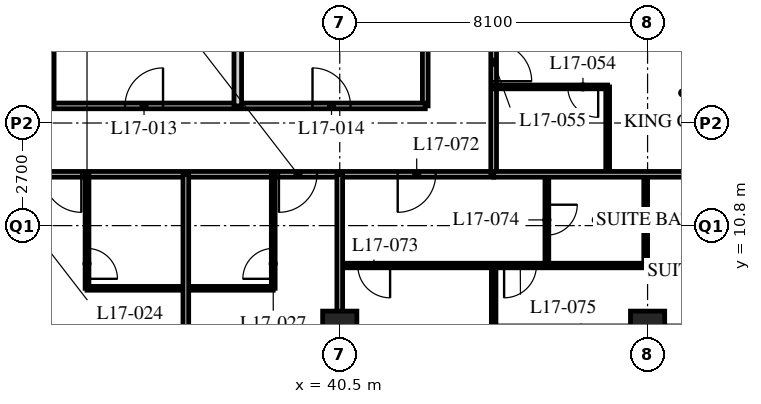
"""IFC4 building model, lengths in metres.
Left out: names, types, materials, properties, quantities, classifications, styles, units other than length and angle.
Written with IfcOpenShell. Run it as: python <this file> out.ifc"""

import sys

from ifc_helpers import new_model, si_unit, direction, frame, frame_2d, origin, origin_2d, place, context, subcontext, project, spatial, rectangle, hollow_rectangle, extrude, element, fill, save


model = new_model("IFC4")
c1 = context("Model", 3, precision=1e-05, world=origin(), true_north=direction((0.0, 1.0)))
c2 = subcontext(c1, "Body", "Model", "MODEL_VIEW")
j1 = project(units=[si_unit("LENGTHUNIT", "METRE"), si_unit("PLANEANGLEUNIT", "RADIAN")], contexts=[c1])
p1 = place(None, origin())
s1 = spatial("IfcSite", under=j1, at=p1, CompositionType="ELEMENT")
p2 = place(p1, origin())
s2 = spatial("IfcBuilding", under=s1, at=p2, CompositionType="ELEMENT")
p3 = place(p2, frame((0.0, 0.0, 70.4)))
s3 = spatial("IfcBuildingStorey", under=s2, at=p3, CompositionType="ELEMENT", Elevation=70.4)
for number, where, z_axis, x_axis in (
    (1, (40.5, 8.1, 0.0), (0.0, 0.0, 1.0), (1.0, 0.0, 0.0)),
    (2, (48.6, 8.1, 0.0), (0.0, 0.0, 1.0), (1.0, 0.0, 0.0)),
):
    element("IfcColumn", number, at=place(p3, frame(where, z_axis=z_axis, x_axis=x_axis)), inside=s3, PredefinedType="COLUMN", context=c2, shape_type="SweptSolid", body=[
        extrude(hollow_rectangle(XDim=0.9, YDim=0.9, WallThickness=0.09, at=origin_2d()), origin(), (0.0, 0.0, 1.0), 3.4),
    ])
p4 = place(p3, frame((8.1, 12.15, 0.0), z_axis=(0.0, 0.0, 1.0), x_axis=(1.0, 0.0, 0.0)))
e3 = element("IfcWall", 3, at=p4, inside=s3, PredefinedType="PARTITIONING", context=c2, shape_type="SweptSolid", body=[
    extrude(rectangle(XDim=36.45, YDim=0.15, at=frame_2d((18.225, 0.0))), origin(), (0.0, 0.0, 1.0), 3.19),
])
p5 = place(p4, frame((4.35, 0.0, 0.0)))
e4 = element("IfcOpeningElement", 4, at=p5, cuts=e3, PredefinedType="OPENING", context=c2, shape_type="SweptSolid", body=[
    extrude(rectangle(XDim=1.0, YDim=2.1, at=frame_2d((0.5, 1.05))), frame((0.0, 0.085, 0.0), z_axis=(0.0, -1.0, 0.0), x_axis=(1.0, 0.0, 0.0)), (0.0, 0.0, 1.0), 0.17),
])
p6 = place(p4, frame((10.55, 0.0, 0.0)))
e5 = element("IfcOpeningElement", 5, at=p6, cuts=e3, PredefinedType="OPENING", context=c2, shape_type="SweptSolid", body=[
    extrude(rectangle(XDim=1.0, YDim=2.1, at=frame_2d((0.5, 1.05))), frame((0.0, 0.085, 0.0), z_axis=(0.0, -1.0, 0.0), x_axis=(1.0, 0.0, 0.0)), (0.0, 0.0, 1.0), 0.17),
])
p7 = place(p4, frame((14.6, 0.0, 0.0)))
e6 = element("IfcOpeningElement", 6, at=p7, cuts=e3, PredefinedType="OPENING", context=c2, shape_type="SweptSolid", body=[
    extrude(rectangle(XDim=1.0, YDim=2.1, at=frame_2d((0.5, 1.05))), frame((0.0, 0.085, 0.0), z_axis=(0.0, -1.0, 0.0), x_axis=(1.0, 0.0, 0.0)), (0.0, 0.0, 1.0), 0.17),
])
p8 = place(p4, frame((18.65, 0.0, 0.0)))
e7 = element("IfcOpeningElement", 7, at=p8, cuts=e3, PredefinedType="OPENING", context=c2, shape_type="SweptSolid", body=[
    extrude(rectangle(XDim=1.0, YDim=2.1, at=frame_2d((0.5, 1.05))), frame((0.0, 0.085, 0.0), z_axis=(0.0, -1.0, 0.0), x_axis=(1.0, 0.0, 0.0)), (0.0, 0.0, 1.0), 0.17),
])
p9 = place(p4, frame((22.7, 0.0, 0.0)))
e8 = element("IfcOpeningElement", 8, at=p9, cuts=e3, PredefinedType="OPENING", context=c2, shape_type="SweptSolid", body=[
    extrude(rectangle(XDim=1.0, YDim=2.1, at=frame_2d((0.5, 1.05))), frame((0.0, 0.085, 0.0), z_axis=(0.0, -1.0, 0.0), x_axis=(1.0, 0.0, 0.0)), (0.0, 0.0, 1.0), 0.17),
])
p10 = place(p4, frame((24.6, 0.0, 0.0)))
e9 = element("IfcOpeningElement", 9, at=p10, cuts=e3, PredefinedType="OPENING", context=c2, shape_type="SweptSolid", body=[
    extrude(rectangle(XDim=1.0, YDim=2.1, at=frame_2d((0.5, 1.05))), frame((0.0, 0.085, 0.0), z_axis=(0.0, -1.0, 0.0), x_axis=(1.0, 0.0, 0.0)), (0.0, 0.0, 1.0), 0.17),
])
p11 = place(p4, frame((30.8, 0.0, 0.0)))
e10 = element("IfcOpeningElement", 10, at=p11, cuts=e3, PredefinedType="OPENING", context=c2, shape_type="SweptSolid", body=[
    extrude(rectangle(XDim=1.0, YDim=2.1, at=frame_2d((0.5, 1.05))), frame((0.0, 0.085, 0.0), z_axis=(0.0, -1.0, 0.0), x_axis=(1.0, 0.0, 0.0)), (0.0, 0.0, 1.0), 0.17),
])
p12 = place(p4, frame((1.525, 0.0, 0.0)))
e11 = element("IfcOpeningElement", 11, at=p12, cuts=e3, PredefinedType="OPENING", context=c2, shape_type="SweptSolid", body=[
    extrude(rectangle(XDim=1.0, YDim=2.1, at=frame_2d((0.5, 1.05))), frame((0.0, 0.085, 0.0), z_axis=(0.0, -1.0, 0.0), x_axis=(1.0, 0.0, 0.0)), (0.0, 0.0, 1.0), 0.17),
])
p13 = place(p4, frame((33.925, 0.0, 0.0)))
e12 = element("IfcOpeningElement", 12, at=p13, cuts=e3, PredefinedType="OPENING", context=c2, shape_type="SweptSolid", body=[
    extrude(rectangle(XDim=1.0, YDim=2.1, at=frame_2d((0.5, 1.05))), frame((0.0, 0.085, 0.0), z_axis=(0.0, -1.0, 0.0), x_axis=(1.0, 0.0, 0.0)), (0.0, 0.0, 1.0), 0.17),
])
p14 = place(p3, frame((44.55, 12.15, 0.0), z_axis=(0.0, 0.0, 1.0), x_axis=(0.0, 1.0, 0.0)))
e13 = element("IfcWall", 13, at=p14, inside=s3, PredefinedType="PARTITIONING", context=c2, shape_type="SweptSolid", body=[
    extrude(rectangle(XDim=30.15, YDim=0.15, at=frame_2d((15.075, 0.0))), origin(), (0.0, 0.0, 1.0), 3.19),
])
p15 = place(p14, frame((2.45, 0.0, 0.0)))
e14 = element("IfcOpeningElement", 14, at=p15, cuts=e13, PredefinedType="OPENING", context=c2, shape_type="SweptSolid", body=[
    extrude(rectangle(XDim=1.0, YDim=2.1, at=frame_2d((0.5, 1.05))), frame((0.0, 0.085, 0.0), z_axis=(0.0, -1.0, 0.0), x_axis=(1.0, 0.0, 0.0)), (0.0, 0.0, 1.0), 0.17),
])
p16 = place(p14, frame((4.35, 0.0, 0.0)))
e15 = element("IfcOpeningElement", 15, at=p16, cuts=e13, PredefinedType="OPENING", context=c2, shape_type="SweptSolid", body=[
    extrude(rectangle(XDim=1.0, YDim=2.1, at=frame_2d((0.5, 1.05))), frame((0.0, 0.085, 0.0), z_axis=(0.0, -1.0, 0.0), x_axis=(1.0, 0.0, 0.0)), (0.0, 0.0, 1.0), 0.17),
])
p17 = place(p14, frame((8.4, 0.0, 0.0)))
e16 = element("IfcOpeningElement", 16, at=p17, cuts=e13, PredefinedType="OPENING", context=c2, shape_type="SweptSolid", body=[
    extrude(rectangle(XDim=1.0, YDim=2.1, at=frame_2d((0.5, 1.05))), frame((0.0, 0.085, 0.0), z_axis=(0.0, -1.0, 0.0), x_axis=(1.0, 0.0, 0.0)), (0.0, 0.0, 1.0), 0.17),
])
p18 = place(p14, frame((14.6, 0.0, 0.0)))
e17 = element("IfcOpeningElement", 17, at=p18, cuts=e13, PredefinedType="OPENING", context=c2, shape_type="SweptSolid", body=[
    extrude(rectangle(XDim=1.0, YDim=2.1, at=frame_2d((0.5, 1.05))), frame((0.0, 0.085, 0.0), z_axis=(0.0, -1.0, 0.0), x_axis=(1.0, 0.0, 0.0)), (0.0, 0.0, 1.0), 0.17),
])
p19 = place(p14, frame((21.65, 0.0, 0.0)))
e18 = element("IfcOpeningElement", 18, at=p19, cuts=e13, PredefinedType="OPENING", context=c2, shape_type="SweptSolid", body=[
    extrude(rectangle(XDim=1.0, YDim=2.1, at=frame_2d((0.5, 1.05))), frame((0.0, 0.085, 0.0), z_axis=(0.0, -1.0, 0.0), x_axis=(1.0, 0.0, 0.0)), (0.0, 0.0, 1.0), 0.17),
])
p20 = place(p14, frame((26.7, 0.0, 0.0)))
e19 = element("IfcOpeningElement", 19, at=p20, cuts=e13, PredefinedType="OPENING", context=c2, shape_type="SweptSolid", body=[
    extrude(rectangle(XDim=1.0, YDim=2.1, at=frame_2d((0.5, 1.05))), frame((0.0, 0.085, 0.0), z_axis=(0.0, -1.0, 0.0), x_axis=(1.0, 0.0, 0.0)), (0.0, 0.0, 1.0), 0.17),
])
p21 = place(p3, frame((42.75, 13.95, 0.0), z_axis=(0.0, 0.0, 1.0), x_axis=(0.0, 1.0, 0.0)))
e20 = element("IfcWall", 20, at=p21, inside=s3, PredefinedType="PARTITIONING", context=c2, shape_type="SweptSolid", body=[
    extrude(rectangle(XDim=26.55, YDim=0.15, at=frame_2d((13.275, 0.0))), origin(), (0.0, 0.0, 1.0), 3.19),
])
p22 = place(p21, frame((13.9, 0.0, 0.0)))
e21 = element("IfcOpeningElement", 21, at=p22, cuts=e20, PredefinedType="OPENING", context=c2, shape_type="SweptSolid", body=[
    extrude(rectangle(XDim=1.0, YDim=2.1, at=frame_2d((0.5, 1.05))), frame((0.0, 0.085, 0.0), z_axis=(0.0, -1.0, 0.0), x_axis=(1.0, 0.0, 0.0)), (0.0, 0.0, 1.0), 0.17),
])
p23 = place(p21, frame((22.0, 0.0, 0.0)))
e22 = element("IfcOpeningElement", 22, at=p23, cuts=e20, PredefinedType="OPENING", context=c2, shape_type="SweptSolid", body=[
    extrude(rectangle(XDim=1.0, YDim=2.1, at=frame_2d((0.5, 1.05))), frame((0.0, 0.085, 0.0), z_axis=(0.0, -1.0, 0.0), x_axis=(1.0, 0.0, 0.0)), (0.0, 0.0, 1.0), 0.17),
])
p24 = place(p3, frame((29.56, 13.95, 0.0), z_axis=(0.0, 0.0, 1.0), x_axis=(1.0, 0.0, 0.0)))
e23 = element("IfcWall", 23, at=p24, inside=s3, PredefinedType="PARTITIONING", context=c2, shape_type="SweptSolid", body=[
    extrude(rectangle(XDim=13.19, YDim=0.15, at=frame_2d((6.595, 0.0))), origin(), (0.0, 0.0, 1.0), 3.19),
])
p25 = place(p24, frame((1.157, 0.0, 0.0)))
e24 = element("IfcOpeningElement", 24, at=p25, cuts=e23, PredefinedType="OPENING", context=c2, shape_type="SweptSolid", body=[
    extrude(rectangle(XDim=1.0, YDim=2.1, at=frame_2d((0.5, 1.05))), frame((0.0, 0.085, 0.0), z_axis=(0.0, -1.0, 0.0), x_axis=(1.0, 0.0, 0.0)), (0.0, 0.0, 1.0), 0.17),
])
p26 = place(p24, frame((5.29, 0.0, 0.0)))
e25 = element("IfcOpeningElement", 25, at=p26, cuts=e23, PredefinedType="OPENING", context=c2, shape_type="SweptSolid", body=[
    extrude(rectangle(XDim=1.0, YDim=2.1, at=frame_2d((0.5, 1.05))), frame((0.0, 0.085, 0.0), z_axis=(0.0, -1.0, 0.0), x_axis=(1.0, 0.0, 0.0)), (0.0, 0.0, 1.0), 0.17),
])
p27 = place(p24, frame((10.223, 0.0, 0.0)))
e26 = element("IfcOpeningElement", 26, at=p27, cuts=e23, PredefinedType="OPENING", context=c2, shape_type="SweptSolid", body=[
    extrude(rectangle(XDim=1.0, YDim=2.1, at=frame_2d((0.5, 1.05))), frame((0.0, 0.085, 0.0), z_axis=(0.0, -1.0, 0.0), x_axis=(1.0, 0.0, 0.0)), (0.0, 0.0, 1.0), 0.17),
])
p28 = place(p3, frame((32.883, 13.95, 0.0), z_axis=(0.0, 0.0, 1.0), x_axis=(0.0, 1.0, 0.0)))
e27 = element("IfcWall", 27, at=p28, inside=s3, PredefinedType="SOLIDWALL", context=c2, shape_type="SweptSolid", body=[
    extrude(rectangle(XDim=3.0, YDim=0.2, at=frame_2d((1.5, 0.0))), origin(), (0.0, 0.0, 1.0), 3.19),
])
p29 = place(p3, frame((37.817, 13.95, 0.0), z_axis=(0.0, 0.0, 1.0), x_axis=(0.0, 1.0, 0.0)))
e28 = element("IfcWall", 28, at=p29, inside=s3, PredefinedType="SOLIDWALL", context=c2, shape_type="SweptSolid", body=[
    extrude(rectangle(XDim=10.35, YDim=0.2, at=frame_2d((5.175, 0.0))), origin(), (0.0, 0.0, 1.0), 3.19),
])
p30 = place(p3, frame((33.85, 9.15, 0.0), z_axis=(0.0, 0.0, 1.0), x_axis=(1.0, 0.0, 0.0)))
e29 = element("IfcWall", 29, at=p30, inside=s3, PredefinedType="PARTITIONING", context=c2, shape_type="SweptSolid", body=[
    extrude(rectangle(XDim=4.9, YDim=0.1, at=frame_2d((2.45, 0.0))), origin(), (0.0, 0.0, 1.0), 3.19),
])
p31 = place(p3, frame((33.85, 12.15, 0.0), z_axis=(0.0, 0.0, 1.0), x_axis=(0.0, -1.0, 0.0)))
e30 = element("IfcWall", 30, at=p31, inside=s3, PredefinedType="PARTITIONING", context=c2, shape_type="SweptSolid", body=[
    extrude(rectangle(XDim=3.0, YDim=0.1, at=frame_2d((1.5, 0.0))), origin(), (0.0, 0.0, 1.0), 3.19),
])
p32 = place(p31, frame((1.95, 0.0, 0.0)))
e31 = element("IfcOpeningElement", 31, at=p32, cuts=e30, PredefinedType="OPENING", context=c2, shape_type="SweptSolid", body=[
    extrude(rectangle(XDim=0.8, YDim=2.1, at=frame_2d((0.4, 1.05))), frame((0.0, 0.06, 0.0), z_axis=(0.0, -1.0, 0.0), x_axis=(1.0, 0.0, 0.0)), (0.0, 0.0, 1.0), 0.12),
])
p33 = place(p3, frame((36.45, 12.15, 0.0), z_axis=(0.0, 0.0, 1.0), x_axis=(0.0, -1.0, 0.0)))
e32 = element("IfcWall", 32, at=p33, inside=s3, PredefinedType="PARTITIONING", context=c2, shape_type="SweptSolid", body=[
    extrude(rectangle(XDim=11.85, YDim=0.15, at=frame_2d((5.925, 0.0))), origin(), (0.0, 0.0, 1.0), 3.19),
])
p34 = place(p3, frame((38.75, 12.15, 0.0), z_axis=(0.0, 0.0, 1.0), x_axis=(0.0, -1.0, 0.0)))
e33 = element("IfcWall", 33, at=p34, inside=s3, PredefinedType="PARTITIONING", context=c2, shape_type="SweptSolid", body=[
    extrude(rectangle(XDim=3.0, YDim=0.1, at=frame_2d((1.5, 0.0))), origin(), (0.0, 0.0, 1.0), 3.19),
])
p35 = place(p34, frame((1.95, 0.0, 0.0)))
e34 = element("IfcOpeningElement", 34, at=p35, cuts=e33, PredefinedType="OPENING", context=c2, shape_type="SweptSolid", body=[
    extrude(rectangle(XDim=0.8, YDim=2.1, at=frame_2d((0.4, 1.05))), frame((0.0, 0.06, 0.0), z_axis=(0.0, -1.0, 0.0), x_axis=(1.0, 0.0, 0.0)), (0.0, 0.0, 1.0), 0.12),
])
p36 = place(p3, frame((47.55, 12.15, 0.0), z_axis=(0.0, 0.0, 1.0), x_axis=(0.0, 1.0, 0.0)))
e35 = element("IfcWall", 35, at=p36, inside=s3, PredefinedType="PARTITIONING", context=c2, shape_type="SweptSolid", body=[
    extrude(rectangle(XDim=2.3, YDim=0.1, at=frame_2d((1.15, 0.0))), origin(), (0.0, 0.0, 1.0), 3.19),
])
p37 = place(p3, frame((44.55, 14.45, 0.0), z_axis=(0.0, 0.0, 1.0), x_axis=(1.0, 0.0, 0.0)))
e36 = element("IfcWall", 36, at=p37, inside=s3, PredefinedType="PARTITIONING", context=c2, shape_type="SweptSolid", body=[
    extrude(rectangle(XDim=3.0, YDim=0.1, at=frame_2d((1.5, 0.0))), origin(), (0.0, 0.0, 1.0), 3.19),
])
p38 = place(p37, frame((1.95, 0.0, 0.0)))
e37 = element("IfcOpeningElement", 37, at=p38, cuts=e36, PredefinedType="OPENING", context=c2, shape_type="SweptSolid", body=[
    extrude(rectangle(XDim=0.8, YDim=2.1, at=frame_2d((0.4, 1.05))), frame((0.0, 0.06, 0.0), z_axis=(0.0, -1.0, 0.0), x_axis=(1.0, 0.0, 0.0)), (0.0, 0.0, 1.0), 0.12),
])
p39 = place(p3, frame((40.5, 9.75, 0.0), z_axis=(0.0, 0.0, 1.0), x_axis=(1.0, 0.0, 0.0)))
e38 = element("IfcWall", 38, at=p39, inside=s3, PredefinedType="PARTITIONING", context=c2, shape_type="SweptSolid", body=[
    extrude(rectangle(XDim=8.05, YDim=0.12, at=frame_2d((4.025, 0.0))), origin(), (0.0, 0.0, 1.0), 3.19),
])
p40 = place(p39, frame((0.475, 0.0, 0.0)))
e39 = element("IfcOpeningElement", 39, at=p40, cuts=e38, PredefinedType="OPENING", context=c2, shape_type="SweptSolid", body=[
    extrude(rectangle(XDim=0.85, YDim=2.1, at=frame_2d((0.425, 1.05))), frame((0.0, 0.07, 0.0), z_axis=(0.0, -1.0, 0.0), x_axis=(1.0, 0.0, 0.0)), (0.0, 0.0, 1.0), 0.14),
])
p41 = place(p39, frame((4.325, 0.0, 0.0)))
e40 = element("IfcOpeningElement", 40, at=p41, cuts=e38, PredefinedType="OPENING", context=c2, shape_type="SweptSolid", body=[
    extrude(rectangle(XDim=0.85, YDim=2.1, at=frame_2d((0.425, 1.05))), frame((0.0, 0.07, 0.0), z_axis=(0.0, -1.0, 0.0), x_axis=(1.0, 0.0, 0.0)), (0.0, 0.0, 1.0), 0.14),
])
p42 = place(p3, frame((45.95, 12.15, 0.0), z_axis=(0.0, 0.0, 1.0), x_axis=(0.0, -1.0, 0.0)))
e41 = element("IfcWall", 41, at=p42, inside=s3, PredefinedType="PARTITIONING", context=c2, shape_type="SweptSolid", body=[
    extrude(rectangle(XDim=2.4, YDim=0.1, at=frame_2d((1.2, 0.0))), origin(), (0.0, 0.0, 1.0), 3.19),
])
p43 = place(p42, frame((0.8, 0.0, 0.0)))
e42 = element("IfcOpeningElement", 42, at=p43, cuts=e41, PredefinedType="OPENING", context=c2, shape_type="SweptSolid", body=[
    extrude(rectangle(XDim=0.8, YDim=2.1, at=frame_2d((0.4, 1.05))), frame((0.0, 0.06, 0.0), z_axis=(0.0, -1.0, 0.0), x_axis=(1.0, 0.0, 0.0)), (0.0, 0.0, 1.0), 0.12),
])
p44 = place(p3, frame((48.55, 12.15, 0.0), z_axis=(0.0, 0.0, 1.0), x_axis=(0.0, -1.0, 0.0)))
e43 = element("IfcWall", 43, at=p44, inside=s3, PredefinedType="PARTITIONING", context=c2, shape_type="SweptSolid", body=[
    extrude(rectangle(XDim=2.4, YDim=0.1, at=frame_2d((1.2, 0.0))), origin(), (0.0, 0.0, 1.0), 2.578),
])
p45 = place(p3, frame((44.55, 9.75, 0.0), z_axis=(0.0, 0.0, 1.0), x_axis=(0.0, -1.0, 0.0)))
e44 = element("IfcWall", 44, at=p45, inside=s3, PredefinedType="PARTITIONING", context=c2, shape_type="SweptSolid", body=[
    extrude(rectangle(XDim=9.45, YDim=0.12, at=frame_2d((4.725, 0.0))), origin(), (0.0, 0.0, 1.0), 3.19),
])
p46 = place(p3, frame((44.55, 12.15, 0.0), z_axis=(0.0, 0.0, 1.0), x_axis=(1.0, 0.0, 0.0)))
e45 = element("IfcWall", 45, at=p46, inside=s3, PredefinedType="PARTITIONING", context=c2, shape_type="SweptSolid", body=[
    extrude(rectangle(XDim=11.85, YDim=0.15, at=frame_2d((5.925, 0.0))), origin(), (0.0, 0.0, 1.0), 3.19),
])
p47 = place(p3, frame((40.5, 12.15, 0.0), z_axis=(0.0, 0.0, 1.0), x_axis=(0.0, -1.0, 0.0)))
e46 = element("IfcWall", 46, at=p47, inside=s3, PredefinedType="PARTITIONING", context=c2, shape_type="SweptSolid", body=[
    extrude(rectangle(XDim=11.85, YDim=0.15, at=frame_2d((5.925, 0.0))), origin(), (0.0, 0.0, 1.0), 2.578),
])
p48 = place(p26, origin())
e47 = element("IfcDoor", 47, at=p48, inside=s3, OperationType="SINGLE_SWING_RIGHT", PredefinedType="DOOR", context=c2, shape_type="SweptSolid", body=[
    extrude(rectangle(XDim=1.0, YDim=2.1, at=frame_2d((0.5, 1.05))), frame((0.0, 0.025, 0.0), z_axis=(0.0, -1.0, 0.0), x_axis=(1.0, 0.0, 0.0)), (0.0, 0.0, 1.0), 0.05),
])
fill(e25, e47)
p49 = place(p27, origin())
e48 = element("IfcDoor", 48, at=p49, inside=s3, OperationType="SINGLE_SWING_LEFT", PredefinedType="DOOR", context=c2, shape_type="SweptSolid", body=[
    extrude(rectangle(XDim=1.0, YDim=2.1, at=frame_2d((0.5, 1.05))), frame((0.0, 0.025, 0.0), z_axis=(0.0, -1.0, 0.0), x_axis=(1.0, 0.0, 0.0)), (0.0, 0.0, 1.0), 0.05),
])
fill(e26, e48)
p50 = place(p32, origin())
e49 = element("IfcDoor", 49, at=p50, inside=s3, OperationType="SINGLE_SWING_RIGHT", PredefinedType="DOOR", context=c2, shape_type="SweptSolid", body=[
    extrude(rectangle(XDim=0.8, YDim=2.1, at=frame_2d((0.4, 1.05))), frame((0.0, 0.025, 0.0), z_axis=(0.0, -1.0, 0.0), x_axis=(1.0, 0.0, 0.0)), (0.0, 0.0, 1.0), 0.05),
])
fill(e31, e49)
p51 = place(p10, origin())
e50 = element("IfcDoor", 50, at=p51, inside=s3, OperationType="SINGLE_SWING_LEFT", PredefinedType="DOOR", context=c2, shape_type="SweptSolid", body=[
    extrude(rectangle(XDim=1.0, YDim=2.1, at=frame_2d((0.5, 1.05))), frame((0.0, 0.025, 0.0), z_axis=(0.0, -1.0, 0.0), x_axis=(1.0, 0.0, 0.0)), (0.0, 0.0, 1.0), 0.05),
])
fill(e9, e50)
p52 = place(p35, origin())
e51 = element("IfcDoor", 51, at=p52, inside=s3, OperationType="SINGLE_SWING_LEFT", PredefinedType="DOOR", context=c2, shape_type="SweptSolid", body=[
    extrude(rectangle(XDim=0.8, YDim=2.1, at=frame_2d((0.4, 1.05))), frame((0.0, 0.025, 0.0), z_axis=(0.0, -1.0, 0.0), x_axis=(1.0, 0.0, 0.0)), (0.0, 0.0, 1.0), 0.05),
])
fill(e34, e51)
p53 = place(p11, origin())
e52 = element("IfcDoor", 52, at=p53, inside=s3, OperationType="SINGLE_SWING_RIGHT", PredefinedType="DOOR", context=c2, shape_type="SweptSolid", body=[
    extrude(rectangle(XDim=1.0, YDim=2.1, at=frame_2d((0.5, 1.05))), frame((0.0, 0.025, 0.0), z_axis=(0.0, -1.0, 0.0), x_axis=(1.0, 0.0, 0.0)), (0.0, 0.0, 1.0), 0.05),
])
fill(e10, e52)
p54 = place(p38, origin())
e53 = element("IfcDoor", 53, at=p54, inside=s3, OperationType="SINGLE_SWING_LEFT", PredefinedType="DOOR", context=c2, shape_type="SweptSolid", body=[
    extrude(rectangle(XDim=0.8, YDim=2.1, at=frame_2d((0.4, 1.05))), frame((0.0, 0.025, 0.0), z_axis=(0.0, -1.0, 0.0), x_axis=(1.0, 0.0, 0.0)), (0.0, 0.0, 1.0), 0.05),
])
fill(e37, e53)
p55 = place(p15, origin())
e54 = element("IfcDoor", 54, at=p55, inside=s3, OperationType="SINGLE_SWING_RIGHT", PredefinedType="DOOR", context=c2, shape_type="SweptSolid", body=[
    extrude(rectangle(XDim=1.0, YDim=2.1, at=frame_2d((0.5, 1.05))), frame((0.0, 0.025, 0.0), z_axis=(0.0, -1.0, 0.0), x_axis=(1.0, 0.0, 0.0)), (0.0, 0.0, 1.0), 0.05),
])
fill(e14, e54)
p56 = place(p13, origin())
e55 = element("IfcDoor", 55, at=p56, inside=s3, OperationType="SINGLE_SWING_RIGHT", PredefinedType="DOOR", context=c2, shape_type="SweptSolid", body=[
    extrude(rectangle(XDim=1.0, YDim=2.1, at=frame_2d((0.5, 1.05))), frame((0.0, 0.025, 0.0), z_axis=(0.0, -1.0, 0.0), x_axis=(1.0, 0.0, 0.0)), (0.0, 0.0, 1.0), 0.05),
])
fill(e12, e55)
p57 = place(p40, origin())
e56 = element("IfcDoor", 56, at=p57, inside=s3, OperationType="SINGLE_SWING_LEFT", PredefinedType="DOOR", context=c2, shape_type="SweptSolid", body=[
    extrude(rectangle(XDim=0.85, YDim=2.1, at=frame_2d((0.425, 1.05))), frame((0.0, 0.025, 0.0), z_axis=(0.0, -1.0, 0.0), x_axis=(1.0, 0.0, 0.0)), (0.0, 0.0, 1.0), 0.05),
])
fill(e39, e56)
p58 = place(p43, origin())
e57 = element("IfcDoor", 57, at=p58, inside=s3, OperationType="SINGLE_SWING_LEFT", PredefinedType="DOOR", context=c2, shape_type="SweptSolid", body=[
    extrude(rectangle(XDim=0.8, YDim=2.1, at=frame_2d((0.4, 1.05))), frame((0.0, 0.025, 0.0), z_axis=(0.0, -1.0, 0.0), x_axis=(1.0, 0.0, 0.0)), (0.0, 0.0, 1.0), 0.05),
])
fill(e42, e57)
p59 = place(p41, origin())
e58 = element("IfcDoor", 58, at=p59, inside=s3, OperationType="SINGLE_SWING_RIGHT", PredefinedType="DOOR", context=c2, shape_type="SweptSolid", body=[
    extrude(rectangle(XDim=0.85, YDim=2.1, at=frame_2d((0.425, 1.05))), frame((0.0, 0.025, 0.0), z_axis=(0.0, -1.0, 0.0), x_axis=(1.0, 0.0, 0.0)), (0.0, 0.0, 1.0), 0.05),
])
fill(e40, e58)
save(model, sys.argv[1])
